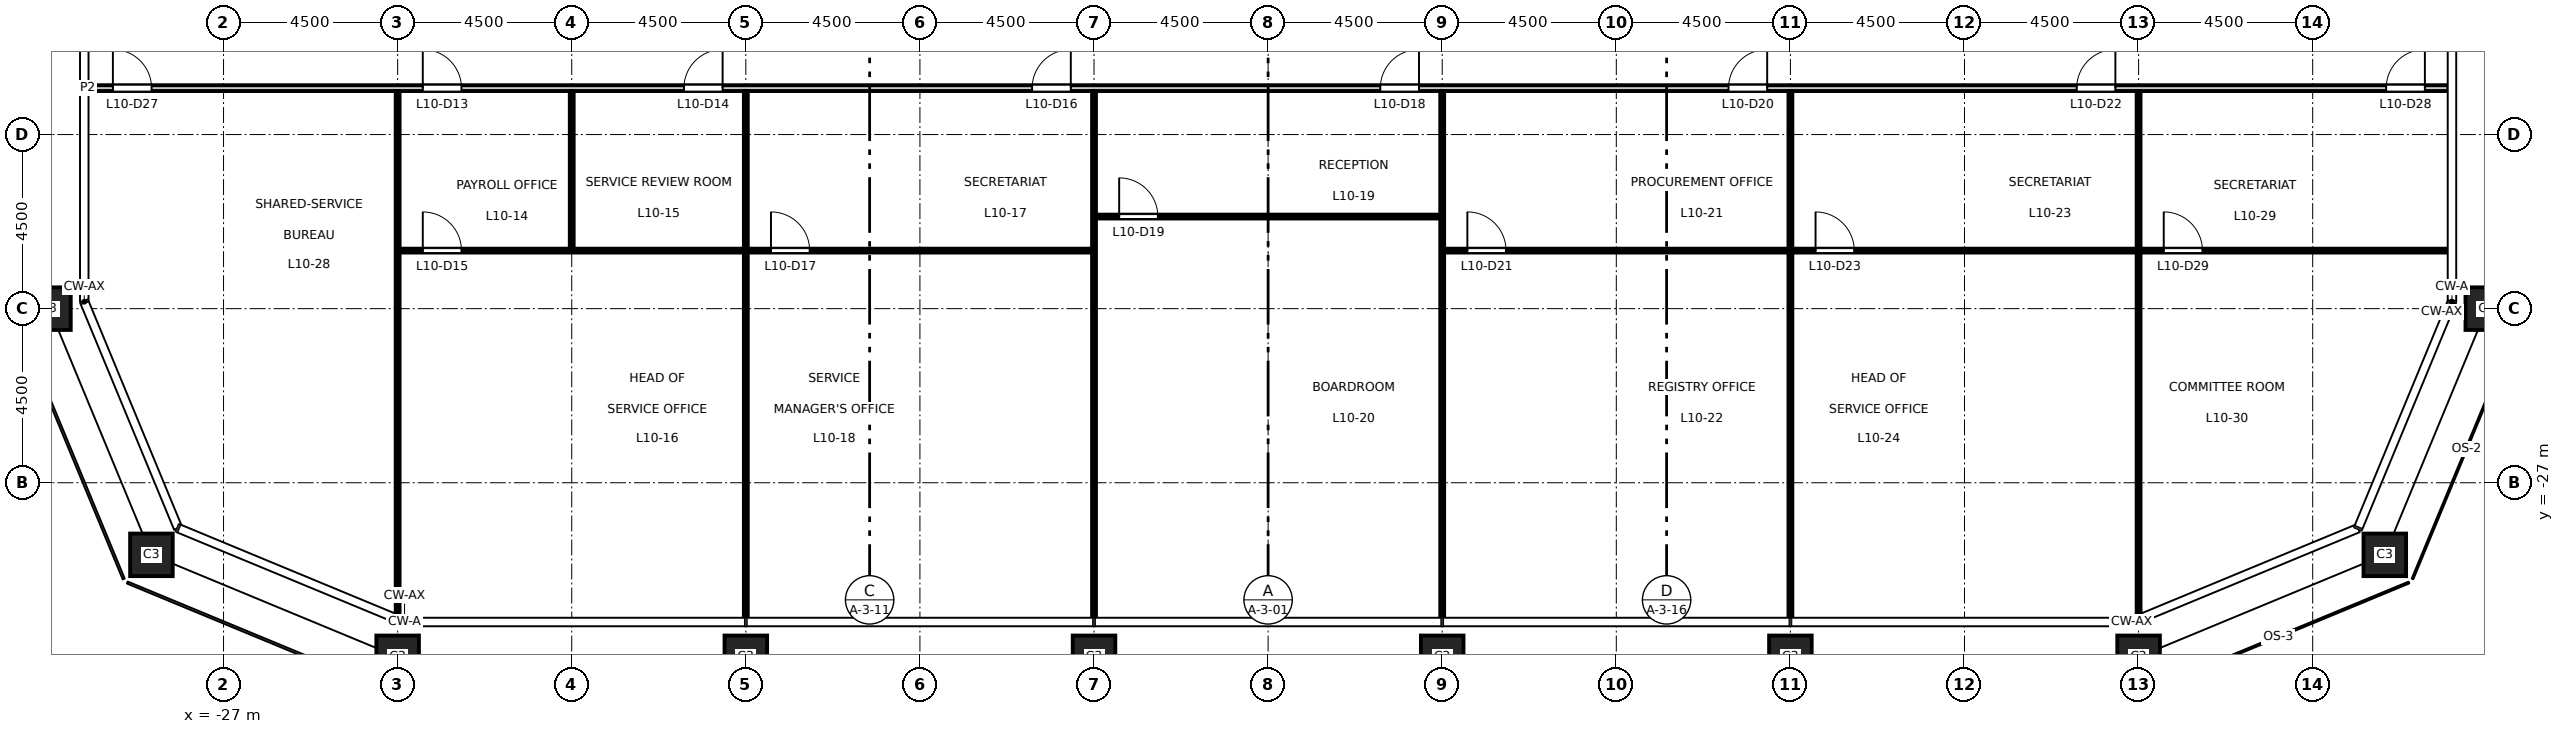
"""IFC4 building model, lengths in metres.
Left out: names, types, materials, properties, quantities, classifications, styles, units other than length and angle.
Written with IfcOpenShell. Run it as: python <this file> out.ifc"""

import sys

from ifc_helpers import new_model, si_unit, direction, frame, frame_2d, origin, origin_2d, place, context, subcontext, project, spatial, rectangle, hollow_rectangle, extrude, element, fill, save


model = new_model("IFC4")
c1 = context("Model", 3, precision=1e-05, world=origin(), true_north=direction((0.0, 1.0)))
c2 = subcontext(c1, "Body", "Model", "MODEL_VIEW")
j1 = project(units=[si_unit("LENGTHUNIT", "METRE"), si_unit("PLANEANGLEUNIT", "RADIAN")], contexts=[c1])
p1 = place(None, origin())
s1 = spatial("IfcSite", under=j1, at=p1, CompositionType="ELEMENT")
p2 = place(p1, origin())
s2 = spatial("IfcBuilding", under=s1, at=p2, CompositionType="ELEMENT")
p3 = place(p2, frame((0.0, 0.0, 49.2)))
s3 = spatial("IfcBuildingStorey", under=s2, at=p3, CompositionType="ELEMENT", Elevation=49.2)
for number, where, z_axis, x_axis in (
    (1, (-22.5, -31.5, 0.0), (0.0, 0.0, 1.0), (1.0, 0.0, 0.0)),
    (2, (-13.5, -31.5, 0.0), (0.0, 0.0, 1.0), (1.0, 0.0, 0.0)),
    (3, (-4.5, -31.5, 0.0), (0.0, 0.0, 1.0), (1.0, 0.0, 0.0)),
    (4, (4.5, -31.5, 0.0), (0.0, 0.0, 1.0), (1.0, 0.0, 0.0)),
    (5, (13.5, -31.5, 0.0), (0.0, 0.0, 1.0), (1.0, 0.0, 0.0)),
    (6, (22.5, -31.5, 0.0), (0.0, 0.0, 1.0), (1.0, 0.0, 0.0)),
    (7, (28.864, -28.864, 0.0), (0.0, 0.0, 1.0), (1.0, 0.0, 0.0)),
    (8, (31.5, -22.5, 0.0), (0.0, 0.0, 1.0), (1.0, 0.0, 0.0)),
    (9, (-31.5, -22.5, 0.0), (0.0, 0.0, 1.0), (1.0, 0.0, 0.0)),
    (10, (-28.864, -28.864, 0.0), (0.0, 0.0, 1.0), (1.0, 0.0, 0.0)),
):
    element("IfcColumn", number, at=place(p3, frame(where, z_axis=z_axis, x_axis=x_axis)), inside=s3, PredefinedType="COLUMN", context=c2, shape_type="SweptSolid", body=[
        extrude(hollow_rectangle(XDim=1.1, YDim=1.1, WallThickness=0.07, at=origin_2d()), origin(), (0.0, 0.0, 1.0), 4.5),
    ])
p4 = place(p3, frame((-22.45, -21.0, 0.0), z_axis=(0.0, 0.0, 1.0), x_axis=(1.0, 0.0, 0.0)))
e11 = element("IfcWall", 11, at=p4, inside=s3, PredefinedType="PARTITIONING", context=c2, shape_type="SweptSolid", body=[
    extrude(rectangle(XDim=17.9, YDim=0.1, at=frame_2d((8.95, 0.0))), origin(), (0.0, 0.0, 1.0), 4.35),
])
p5 = place(p4, frame((0.6, 0.0, 0.0)))
e12 = element("IfcOpeningElement", 12, at=p5, cuts=e11, PredefinedType="OPENING", context=c2, shape_type="SweptSolid", body=[
    extrude(rectangle(XDim=1.0, YDim=2.1, at=frame_2d((0.5, 1.05))), frame((0.0, 0.06, 0.0), z_axis=(0.0, -1.0, 0.0), x_axis=(1.0, 0.0, 0.0)), (0.0, 0.0, 1.0), 0.12),
])
p6 = place(p4, frame((9.6, 0.0, 0.0)))
e13 = element("IfcOpeningElement", 13, at=p6, cuts=e11, PredefinedType="OPENING", context=c2, shape_type="SweptSolid", body=[
    extrude(rectangle(XDim=1.0, YDim=2.1, at=frame_2d((0.5, 1.05))), frame((0.0, 0.06, 0.0), z_axis=(0.0, -1.0, 0.0), x_axis=(1.0, 0.0, 0.0)), (0.0, 0.0, 1.0), 0.12),
])
p7 = place(p3, frame((4.55, -21.0, 0.0), z_axis=(0.0, 0.0, 1.0), x_axis=(1.0, 0.0, 0.0)))
e14 = element("IfcWall", 14, at=p7, inside=s3, PredefinedType="PARTITIONING", context=c2, shape_type="SweptSolid", body=[
    extrude(rectangle(XDim=25.96, YDim=0.1, at=frame_2d((12.98, 0.0))), origin(), (0.0, 0.0, 1.0), 4.35),
])
p8 = place(p7, frame((0.6, 0.0, 0.0)))
e15 = element("IfcOpeningElement", 15, at=p8, cuts=e14, PredefinedType="OPENING", context=c2, shape_type="SweptSolid", body=[
    extrude(rectangle(XDim=1.0, YDim=2.1, at=frame_2d((0.5, 1.05))), frame((0.0, 0.06, 0.0), z_axis=(0.0, -1.0, 0.0), x_axis=(1.0, 0.0, 0.0)), (0.0, 0.0, 1.0), 0.12),
])
p9 = place(p7, frame((9.6, 0.0, 0.0)))
e16 = element("IfcOpeningElement", 16, at=p9, cuts=e14, PredefinedType="OPENING", context=c2, shape_type="SweptSolid", body=[
    extrude(rectangle(XDim=1.0, YDim=2.1, at=frame_2d((0.5, 1.05))), frame((0.0, 0.06, 0.0), z_axis=(0.0, -1.0, 0.0), x_axis=(1.0, 0.0, 0.0)), (0.0, 0.0, 1.0), 0.12),
])
p10 = place(p7, frame((18.6, 0.0, 0.0)))
e17 = element("IfcOpeningElement", 17, at=p10, cuts=e14, PredefinedType="OPENING", context=c2, shape_type="SweptSolid", body=[
    extrude(rectangle(XDim=1.0, YDim=2.1, at=frame_2d((0.5, 1.05))), frame((0.0, 0.06, 0.0), z_axis=(0.0, -1.0, 0.0), x_axis=(1.0, 0.0, 0.0)), (0.0, 0.0, 1.0), 0.12),
])
p11 = place(p3, frame((-4.45, -20.12, 0.0), z_axis=(0.0, 0.0, 1.0), x_axis=(1.0, 0.0, 0.0)))
e18 = element("IfcWall", 18, at=p11, inside=s3, PredefinedType="PARTITIONING", context=c2, shape_type="SweptSolid", body=[
    extrude(rectangle(XDim=8.9, YDim=0.1, at=frame_2d((4.45, 0.0))), origin(), (0.0, 0.0, 1.0), 4.35),
])
p12 = place(p11, frame((0.6, 0.0, 0.0)))
e19 = element("IfcOpeningElement", 19, at=p12, cuts=e18, PredefinedType="OPENING", context=c2, shape_type="SweptSolid", body=[
    extrude(rectangle(XDim=1.0, YDim=2.1, at=frame_2d((0.5, 1.05))), frame((0.0, 0.06, 0.0), z_axis=(0.0, -1.0, 0.0), x_axis=(1.0, 0.0, 0.0)), (0.0, 0.0, 1.0), 0.12),
])
p13 = place(p3, frame((-30.51, -16.8, 0.0), z_axis=(0.0, 0.0, 1.0), x_axis=(1.0, 0.0, 0.0)))
e20 = element("IfcWall", 20, at=p13, inside=s3, PredefinedType="PARTITIONING", context=c2, shape_type="SweptSolid", body=[
    extrude(rectangle(XDim=61.02, YDim=0.15, at=frame_2d((30.51, 0.0))), origin(), (0.0, 0.0, 1.0), 4.35),
])
p14 = place(p13, frame((8.66, 0.0, 0.0)))
e21 = element("IfcOpeningElement", 21, at=p14, cuts=e20, PredefinedType="OPENING", context=c2, shape_type="SweptSolid", body=[
    extrude(rectangle(XDim=1.0, YDim=2.1, at=frame_2d((0.5, 1.05))), frame((0.0, 0.085, 0.0), z_axis=(0.0, -1.0, 0.0), x_axis=(1.0, 0.0, 0.0)), (0.0, 0.0, 1.0), 0.17),
])
p15 = place(p13, frame((15.41, 0.0, 0.0)))
e22 = element("IfcOpeningElement", 22, at=p15, cuts=e20, PredefinedType="OPENING", context=c2, shape_type="SweptSolid", body=[
    extrude(rectangle(XDim=1.0, YDim=2.1, at=frame_2d((0.5, 1.05))), frame((0.0, 0.085, 0.0), z_axis=(0.0, -1.0, 0.0), x_axis=(1.0, 0.0, 0.0)), (0.0, 0.0, 1.0), 0.17),
])
p16 = place(p13, frame((24.41, 0.0, 0.0)))
e23 = element("IfcOpeningElement", 23, at=p16, cuts=e20, PredefinedType="OPENING", context=c2, shape_type="SweptSolid", body=[
    extrude(rectangle(XDim=1.0, YDim=2.1, at=frame_2d((0.5, 1.05))), frame((0.0, 0.085, 0.0), z_axis=(0.0, -1.0, 0.0), x_axis=(1.0, 0.0, 0.0)), (0.0, 0.0, 1.0), 0.17),
])
p17 = place(p13, frame((33.41, 0.0, 0.0)))
e24 = element("IfcOpeningElement", 24, at=p17, cuts=e20, PredefinedType="OPENING", context=c2, shape_type="SweptSolid", body=[
    extrude(rectangle(XDim=1.0, YDim=2.1, at=frame_2d((0.5, 1.05))), frame((0.0, 0.085, 0.0), z_axis=(0.0, -1.0, 0.0), x_axis=(1.0, 0.0, 0.0)), (0.0, 0.0, 1.0), 0.17),
])
p18 = place(p13, frame((42.41, 0.0, 0.0)))
e25 = element("IfcOpeningElement", 25, at=p18, cuts=e20, PredefinedType="OPENING", context=c2, shape_type="SweptSolid", body=[
    extrude(rectangle(XDim=1.0, YDim=2.1, at=frame_2d((0.5, 1.05))), frame((0.0, 0.085, 0.0), z_axis=(0.0, -1.0, 0.0), x_axis=(1.0, 0.0, 0.0)), (0.0, 0.0, 1.0), 0.17),
])
p19 = place(p13, frame((51.41, 0.0, 0.0)))
e26 = element("IfcOpeningElement", 26, at=p19, cuts=e20, PredefinedType="OPENING", context=c2, shape_type="SweptSolid", body=[
    extrude(rectangle(XDim=1.0, YDim=2.1, at=frame_2d((0.5, 1.05))), frame((0.0, 0.085, 0.0), z_axis=(0.0, -1.0, 0.0), x_axis=(1.0, 0.0, 0.0)), (0.0, 0.0, 1.0), 0.17),
])
p20 = place(p13, frame((0.65, 0.0, 0.0)))
e27 = element("IfcOpeningElement", 27, at=p20, cuts=e20, PredefinedType="OPENING", context=c2, shape_type="SweptSolid", body=[
    extrude(rectangle(XDim=1.0, YDim=2.1, at=frame_2d((0.5, 1.05))), frame((0.0, 0.085, 0.0), z_axis=(0.0, -1.0, 0.0), x_axis=(1.0, 0.0, 0.0)), (0.0, 0.0, 1.0), 0.17),
])
p21 = place(p13, frame((59.41, 0.0, 0.0)))
e28 = element("IfcOpeningElement", 28, at=p21, cuts=e20, PredefinedType="OPENING", context=c2, shape_type="SweptSolid", body=[
    extrude(rectangle(XDim=1.0, YDim=2.1, at=frame_2d((0.5, 1.05))), frame((0.0, 0.085, 0.0), z_axis=(0.0, -1.0, 0.0), x_axis=(1.0, 0.0, 0.0)), (0.0, 0.0, 1.0), 0.17),
])
p22 = place(p3, frame((-22.5, -30.428, 0.0), z_axis=(0.0, 0.0, 1.0), x_axis=(0.0, 1.0, 0.0)))
e29 = element("IfcWall", 29, at=p22, inside=s3, PredefinedType="PARTITIONING", context=c2, shape_type="SweptSolid", body=[
    extrude(rectangle(XDim=13.553, YDim=0.1, at=frame_2d((6.776, 0.0))), origin(), (0.0, 0.0, 1.0), 3.35),
])
p23 = place(p3, frame((-18.0, -20.95, 0.0), z_axis=(0.0, 0.0, 1.0), x_axis=(0.0, 1.0, 0.0)))
e30 = element("IfcWall", 30, at=p23, inside=s3, PredefinedType="PARTITIONING", context=c2, shape_type="SweptSolid", body=[
    extrude(rectangle(XDim=4.075, YDim=0.1, at=frame_2d((2.038, 0.0))), origin(), (0.0, 0.0, 1.0), 4.35),
])
p24 = place(p3, frame((-13.5, -30.51, 0.0), z_axis=(0.0, 0.0, 1.0), x_axis=(0.0, 1.0, 0.0)))
e31 = element("IfcWall", 31, at=p24, inside=s3, PredefinedType="PARTITIONING", context=c2, shape_type="SweptSolid", body=[
    extrude(rectangle(XDim=9.46, YDim=0.1, at=frame_2d((4.73, 0.0))), origin(), (0.0, 0.0, 1.0), 3.35),
])
p25 = place(p3, frame((-13.5, -20.95, 0.0), z_axis=(0.0, 0.0, 1.0), x_axis=(0.0, 1.0, 0.0)))
e32 = element("IfcWall", 32, at=p25, inside=s3, PredefinedType="PARTITIONING", context=c2, shape_type="SweptSolid", body=[
    extrude(rectangle(XDim=4.075, YDim=0.1, at=frame_2d((2.038, 0.0))), origin(), (0.0, 0.0, 1.0), 3.35),
])
for number, where, z_axis, x_axis in (
    (33, (-4.5, -30.51, 0.0), (0.0, 0.0, 1.0), (0.0, 1.0, 0.0)),
    (34, (4.5, -30.51, 0.0), (0.0, 0.0, 1.0), (0.0, 1.0, 0.0)),
):
    element("IfcWall", number, at=place(p3, frame(where, z_axis=z_axis, x_axis=x_axis)), inside=s3, PredefinedType="PARTITIONING", context=c2, shape_type="SweptSolid", body=[
        extrude(rectangle(XDim=13.635, YDim=0.1, at=frame_2d((6.817, 0.0))), origin(), (0.0, 0.0, 1.0), 3.35),
    ])
p26 = place(p3, frame((13.5, -30.51, 0.0), z_axis=(0.0, 0.0, 1.0), x_axis=(0.0, 1.0, 0.0)))
e35 = element("IfcWall", 35, at=p26, inside=s3, PredefinedType="PARTITIONING", context=c2, shape_type="SweptSolid", body=[
    extrude(rectangle(XDim=9.46, YDim=0.1, at=frame_2d((4.73, 0.0))), origin(), (0.0, 0.0, 1.0), 3.35),
])
p27 = place(p3, frame((13.5, -20.95, 0.0), z_axis=(0.0, 0.0, 1.0), x_axis=(0.0, 1.0, 0.0)))
e36 = element("IfcWall", 36, at=p27, inside=s3, PredefinedType="PARTITIONING", context=c2, shape_type="SweptSolid", body=[
    extrude(rectangle(XDim=4.075, YDim=0.1, at=frame_2d((2.038, 0.0))), origin(), (0.0, 0.0, 1.0), 3.35),
])
p28 = place(p3, frame((22.5, -30.428, 0.0), z_axis=(0.0, 0.0, 1.0), x_axis=(0.0, 1.0, 0.0)))
e37 = element("IfcWall", 37, at=p28, inside=s3, PredefinedType="PARTITIONING", context=c2, shape_type="SweptSolid", body=[
    extrude(rectangle(XDim=9.378, YDim=0.1, at=frame_2d((4.689, 0.0))), origin(), (0.0, 0.0, 1.0), 3.35),
])
p29 = place(p3, frame((22.5, -20.95, 0.0), z_axis=(0.0, 0.0, 1.0), x_axis=(0.0, 1.0, 0.0)))
e38 = element("IfcWall", 38, at=p29, inside=s3, PredefinedType="PARTITIONING", context=c2, shape_type="SweptSolid", body=[
    extrude(rectangle(XDim=4.075, YDim=0.1, at=frame_2d((2.038, 0.0))), origin(), (0.0, 0.0, 1.0), 3.35),
])
p30 = place(p14, origin())
e39 = element("IfcDoor", 39, at=p30, inside=s3, OperationType="SINGLE_SWING_LEFT", PredefinedType="DOOR", context=c2, shape_type="SweptSolid", body=[
    extrude(rectangle(XDim=1.0, YDim=2.1, at=frame_2d((0.5, 1.05))), frame((0.0, 0.025, 0.0), z_axis=(0.0, -1.0, 0.0), x_axis=(1.0, 0.0, 0.0)), (0.0, 0.0, 1.0), 0.05),
])
fill(e21, e39)
p31 = place(p15, origin())
e40 = element("IfcDoor", 40, at=p31, inside=s3, OperationType="SINGLE_SWING_RIGHT", PredefinedType="DOOR", context=c2, shape_type="SweptSolid", body=[
    extrude(rectangle(XDim=1.0, YDim=2.1, at=frame_2d((0.5, 1.05))), frame((0.0, 0.025, 0.0), z_axis=(0.0, -1.0, 0.0), x_axis=(1.0, 0.0, 0.0)), (0.0, 0.0, 1.0), 0.05),
])
fill(e22, e40)
p32 = place(p5, origin())
e41 = element("IfcDoor", 41, at=p32, inside=s3, OperationType="SINGLE_SWING_LEFT", PredefinedType="DOOR", context=c2, shape_type="SweptSolid", body=[
    extrude(rectangle(XDim=1.0, YDim=2.1, at=frame_2d((0.5, 1.05))), frame((0.0, 0.025, 0.0), z_axis=(0.0, -1.0, 0.0), x_axis=(1.0, 0.0, 0.0)), (0.0, 0.0, 1.0), 0.05),
])
fill(e12, e41)
p33 = place(p16, origin())
e42 = element("IfcDoor", 42, at=p33, inside=s3, OperationType="SINGLE_SWING_RIGHT", PredefinedType="DOOR", context=c2, shape_type="SweptSolid", body=[
    extrude(rectangle(XDim=1.0, YDim=2.1, at=frame_2d((0.5, 1.05))), frame((0.0, 0.025, 0.0), z_axis=(0.0, -1.0, 0.0), x_axis=(1.0, 0.0, 0.0)), (0.0, 0.0, 1.0), 0.05),
])
fill(e23, e42)
p34 = place(p6, origin())
e43 = element("IfcDoor", 43, at=p34, inside=s3, OperationType="SINGLE_SWING_LEFT", PredefinedType="DOOR", context=c2, shape_type="SweptSolid", body=[
    extrude(rectangle(XDim=1.0, YDim=2.1, at=frame_2d((0.5, 1.05))), frame((0.0, 0.025, 0.0), z_axis=(0.0, -1.0, 0.0), x_axis=(1.0, 0.0, 0.0)), (0.0, 0.0, 1.0), 0.05),
])
fill(e13, e43)
p35 = place(p17, origin())
e44 = element("IfcDoor", 44, at=p35, inside=s3, OperationType="SINGLE_SWING_RIGHT", PredefinedType="DOOR", context=c2, shape_type="SweptSolid", body=[
    extrude(rectangle(XDim=1.0, YDim=2.1, at=frame_2d((0.5, 1.05))), frame((0.0, 0.025, 0.0), z_axis=(0.0, -1.0, 0.0), x_axis=(1.0, 0.0, 0.0)), (0.0, 0.0, 1.0), 0.05),
])
fill(e24, e44)
p36 = place(p12, origin())
e45 = element("IfcDoor", 45, at=p36, inside=s3, OperationType="SINGLE_SWING_LEFT", PredefinedType="DOOR", context=c2, shape_type="SweptSolid", body=[
    extrude(rectangle(XDim=1.0, YDim=2.1, at=frame_2d((0.5, 1.05))), frame((0.0, 0.025, 0.0), z_axis=(0.0, -1.0, 0.0), x_axis=(1.0, 0.0, 0.0)), (0.0, 0.0, 1.0), 0.05),
])
fill(e19, e45)
p37 = place(p18, origin())
e46 = element("IfcDoor", 46, at=p37, inside=s3, OperationType="SINGLE_SWING_RIGHT", PredefinedType="DOOR", context=c2, shape_type="SweptSolid", body=[
    extrude(rectangle(XDim=1.0, YDim=2.1, at=frame_2d((0.5, 1.05))), frame((0.0, 0.025, 0.0), z_axis=(0.0, -1.0, 0.0), x_axis=(1.0, 0.0, 0.0)), (0.0, 0.0, 1.0), 0.05),
])
fill(e25, e46)
p38 = place(p8, origin())
e47 = element("IfcDoor", 47, at=p38, inside=s3, OperationType="SINGLE_SWING_LEFT", PredefinedType="DOOR", context=c2, shape_type="SweptSolid", body=[
    extrude(rectangle(XDim=1.0, YDim=2.1, at=frame_2d((0.5, 1.05))), frame((0.0, 0.025, 0.0), z_axis=(0.0, -1.0, 0.0), x_axis=(1.0, 0.0, 0.0)), (0.0, 0.0, 1.0), 0.05),
])
fill(e15, e47)
p39 = place(p19, origin())
e48 = element("IfcDoor", 48, at=p39, inside=s3, OperationType="SINGLE_SWING_RIGHT", PredefinedType="DOOR", context=c2, shape_type="SweptSolid", body=[
    extrude(rectangle(XDim=1.0, YDim=2.1, at=frame_2d((0.5, 1.05))), frame((0.0, 0.025, 0.0), z_axis=(0.0, -1.0, 0.0), x_axis=(1.0, 0.0, 0.0)), (0.0, 0.0, 1.0), 0.05),
])
fill(e26, e48)
p40 = place(p9, origin())
e49 = element("IfcDoor", 49, at=p40, inside=s3, OperationType="SINGLE_SWING_LEFT", PredefinedType="DOOR", context=c2, shape_type="SweptSolid", body=[
    extrude(rectangle(XDim=1.0, YDim=2.1, at=frame_2d((0.5, 1.05))), frame((0.0, 0.025, 0.0), z_axis=(0.0, -1.0, 0.0), x_axis=(1.0, 0.0, 0.0)), (0.0, 0.0, 1.0), 0.05),
])
fill(e16, e49)
p41 = place(p20, origin())
e50 = element("IfcDoor", 50, at=p41, inside=s3, OperationType="SINGLE_SWING_LEFT", PredefinedType="DOOR", context=c2, shape_type="SweptSolid", body=[
    extrude(rectangle(XDim=1.0, YDim=2.1, at=frame_2d((0.5, 1.05))), frame((0.0, 0.025, 0.0), z_axis=(0.0, -1.0, 0.0), x_axis=(1.0, 0.0, 0.0)), (0.0, 0.0, 1.0), 0.05),
])
fill(e27, e50)
p42 = place(p21, origin())
e51 = element("IfcDoor", 51, at=p42, inside=s3, OperationType="SINGLE_SWING_RIGHT", PredefinedType="DOOR", context=c2, shape_type="SweptSolid", body=[
    extrude(rectangle(XDim=1.0, YDim=2.1, at=frame_2d((0.5, 1.05))), frame((0.0, 0.025, 0.0), z_axis=(0.0, -1.0, 0.0), x_axis=(1.0, 0.0, 0.0)), (0.0, 0.0, 1.0), 0.05),
])
fill(e28, e51)
p43 = place(p10, origin())
e52 = element("IfcDoor", 52, at=p43, inside=s3, OperationType="SINGLE_SWING_LEFT", PredefinedType="DOOR", context=c2, shape_type="SweptSolid", body=[
    extrude(rectangle(XDim=1.0, YDim=2.1, at=frame_2d((0.5, 1.05))), frame((0.0, 0.025, 0.0), z_axis=(0.0, -1.0, 0.0), x_axis=(1.0, 0.0, 0.0)), (0.0, 0.0, 1.0), 0.05),
])
fill(e17, e52)
save(model, sys.argv[1])
